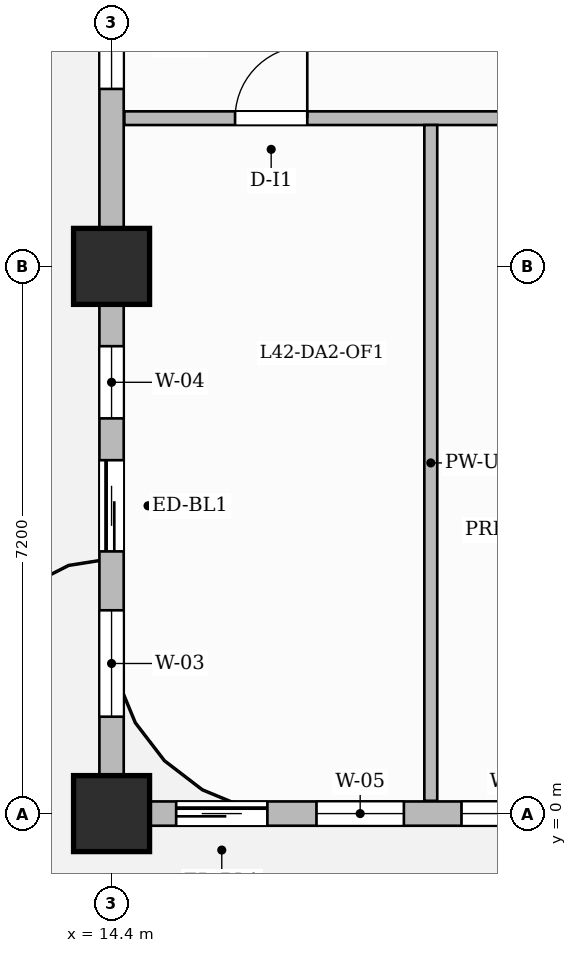
"""IFC4 building model, lengths in metres.
Left out: names, types, materials, properties, quantities, classifications, styles, units other than length and angle.
Written with IfcOpenShell. Run it as: python <this file> out.ifc"""

import sys

from ifc_helpers import new_model, si_unit, direction, frame, frame_2d, origin, origin_2d, place, context, subcontext, project, spatial, rectangle, extrude, source, transform, mapped, element, fill, save


model = new_model("IFC4")
c1 = context("Model", 3, precision=1e-05, world=origin(), true_north=direction((0.0, 1.0)))
c2 = subcontext(c1, "Body", "Model", "MODEL_VIEW")
j1 = project(units=[si_unit("LENGTHUNIT", "METRE"), si_unit("PLANEANGLEUNIT", "RADIAN")], contexts=[c1])
p1 = place(None, origin())
s1 = spatial("IfcSite", under=j1, at=p1, CompositionType="ELEMENT")
p2 = place(p1, origin())
s2 = spatial("IfcBuilding", under=s1, at=p2, CompositionType="ELEMENT")
p3 = place(p2, frame((0.0, 0.0, 169.55)))
s3 = spatial("IfcBuildingStorey", under=s2, at=p3, CompositionType="ELEMENT", Elevation=169.55)
m1 = source(origin(), c2, "Body", "SweptSolid", [
    extrude(rectangle(XDim=1.0, YDim=1.0, at=origin_2d()), origin(), (0.0, 0.0, 1.0), 3.85),
])
for number, where, z_axis, x_axis in (
    (1, (14.4, 0.0, 0.0), (0.0, 0.0, 1.0), (1.0, 0.0, 0.0)),
    (2, (14.4, 7.2, 0.0), (0.0, 0.0, 1.0), (1.0, 0.0, 0.0)),
):
    element("IfcColumn", number, at=place(p3, frame(where, z_axis=z_axis, x_axis=x_axis)), inside=s3, PredefinedType="COLUMN", context=c2, shape_type="MappedRepresentation", body=[
        mapped(m1, transform((0.0, 0.0, 0.0), scale=1.0)),
    ])
p4 = place(p3, frame((14.568, 9.15, 0.0), z_axis=(0.0, 0.0, 1.0), x_axis=(1.0, 0.0, 0.0)))
e3 = element("IfcWall", 3, at=p4, inside=s3, PredefinedType="PARTITIONING", context=c2, shape_type="SweptSolid", body=[
    extrude(rectangle(XDim=15.542, YDim=0.18, at=frame_2d((7.771, 0.0))), origin(), (0.0, 0.0, 1.0), 3.6),
])
p5 = place(p4, frame((1.457, 0.0, 0.0)))
e4 = element("IfcOpeningElement", 4, at=p5, cuts=e3, PredefinedType="OPENING", context=c2, shape_type="SweptSolid", body=[
    extrude(rectangle(XDim=0.95, YDim=2.15, at=frame_2d((0.475, 1.075))), frame((0.0, 0.1, 0.0), z_axis=(0.0, -1.0, 0.0), x_axis=(1.0, 0.0, 0.0)), (0.0, 0.0, 1.0), 0.2),
])
p6 = place(p4, frame((6.117, 0.0, 0.0)))
e5 = element("IfcOpeningElement", 5, at=p6, cuts=e3, PredefinedType="OPENING", context=c2, shape_type="SweptSolid", body=[
    extrude(rectangle(XDim=0.95, YDim=2.15, at=frame_2d((0.475, 1.075))), frame((0.0, 0.1, 0.0), z_axis=(0.0, -1.0, 0.0), x_axis=(1.0, 0.0, 0.0)), (0.0, 0.0, 1.0), 0.2),
])
p7 = place(p4, frame((10.157, 0.0, 0.0)))
e6 = element("IfcOpeningElement", 6, at=p7, cuts=e3, PredefinedType="OPENING", context=c2, shape_type="SweptSolid", body=[
    extrude(rectangle(XDim=0.95, YDim=2.15, at=frame_2d((0.475, 1.075))), frame((0.0, 0.1, 0.0), z_axis=(0.0, -1.0, 0.0), x_axis=(1.0, 0.0, 0.0)), (0.0, 0.0, 1.0), 0.2),
])
p8 = place(p4, frame((13.397, 0.0, 0.0)))
e7 = element("IfcOpeningElement", 7, at=p8, cuts=e3, PredefinedType="OPENING", context=c2, shape_type="SweptSolid", body=[
    extrude(rectangle(XDim=0.95, YDim=2.15, at=frame_2d((0.475, 1.075))), frame((0.0, 0.1, 0.0), z_axis=(0.0, -1.0, 0.0), x_axis=(1.0, 0.0, 0.0)), (0.0, 0.0, 1.0), 0.2),
])
p9 = place(p3, frame((18.6, 0.168, 0.0), z_axis=(0.0, 0.0, 1.0), x_axis=(0.0, 1.0, 0.0)))
e8 = element("IfcWall", 8, at=p9, inside=s3, PredefinedType="PARTITIONING", context=c2, shape_type="SweptSolid", body=[
    extrude(rectangle(XDim=8.892, YDim=0.17, at=frame_2d((4.446, 0.0))), origin(), (0.0, 0.0, 1.0), 3.6),
])
p10 = place(p3, frame((14.4, 0.0, 0.0), z_axis=(0.0, 0.0, 1.0), x_axis=(1.0, 0.0, 0.0)))
e9 = element("IfcWall", 9, at=p10, inside=s3, PredefinedType="SOLIDWALL", context=c2, shape_type="SweptSolid", body=[
    extrude(rectangle(XDim=35.4, YDim=0.32, at=frame_2d((17.7, 0.0))), origin(), (0.0, 0.0, 1.0), 3.085),
])
p11 = place(p10, frame((0.85, 0.0, 0.0)))
e10 = element("IfcOpeningElement", 10, at=p11, cuts=e9, PredefinedType="OPENING", context=c2, shape_type="SweptSolid", body=[
    extrude(rectangle(XDim=1.2, YDim=2.2, at=frame_2d((0.6, 1.1))), frame((0.0, 0.17, 0.0), z_axis=(0.0, -1.0, 0.0), x_axis=(1.0, 0.0, 0.0)), (0.0, 0.0, 1.0), 0.34),
])
p12 = place(p10, frame((2.696, 0.0, 0.8)))
e11 = element("IfcOpeningElement", 11, at=p12, cuts=e9, PredefinedType="OPENING", context=c2, shape_type="SweptSolid", body=[
    extrude(rectangle(XDim=1.15, YDim=1.8, at=frame_2d((0.575, 0.9))), frame((0.0, 0.17, 0.0), z_axis=(0.0, -1.0, 0.0), x_axis=(1.0, 0.0, 0.0)), (0.0, 0.0, 1.0), 0.34),
])
p13 = place(p10, frame((4.604, 0.0, 0.8)))
e12 = element("IfcOpeningElement", 12, at=p13, cuts=e9, PredefinedType="OPENING", context=c2, shape_type="SweptSolid", body=[
    extrude(rectangle(XDim=1.4, YDim=1.85, at=frame_2d((0.7, 0.925))), frame((0.0, 0.17, 0.0), z_axis=(0.0, -1.0, 0.0), x_axis=(1.0, 0.0, 0.0)), (0.0, 0.0, 1.0), 0.34),
])
p14 = place(p10, frame((8.181, 0.0, 0.8)))
e13 = element("IfcOpeningElement", 13, at=p14, cuts=e9, PredefinedType="OPENING", context=c2, shape_type="SweptSolid", body=[
    extrude(rectangle(XDim=0.95, YDim=1.75, at=frame_2d((0.475, 0.875))), frame((0.0, 0.17, 0.0), z_axis=(0.0, -1.0, 0.0), x_axis=(1.0, 0.0, 0.0)), (0.0, 0.0, 1.0), 0.34),
])
p15 = place(p10, frame((9.9, 0.0, 0.8)))
e14 = element("IfcOpeningElement", 14, at=p15, cuts=e9, PredefinedType="OPENING", context=c2, shape_type="SweptSolid", body=[
    extrude(rectangle(XDim=1.8, YDim=1.85, at=frame_2d((0.9, 0.925))), frame((0.0, 0.17, 0.0), z_axis=(0.0, -1.0, 0.0), x_axis=(1.0, 0.0, 0.0)), (0.0, 0.0, 1.0), 0.34),
])
p16 = place(p10, frame((12.469, 0.0, 0.8)))
e15 = element("IfcOpeningElement", 15, at=p16, cuts=e9, PredefinedType="OPENING", context=c2, shape_type="SweptSolid", body=[
    extrude(rectangle(XDim=0.95, YDim=1.75, at=frame_2d((0.475, 0.875))), frame((0.0, 0.17, 0.0), z_axis=(0.0, -1.0, 0.0), x_axis=(1.0, 0.0, 0.0)), (0.0, 0.0, 1.0), 0.34),
])
p17 = place(p10, frame((16.804, 0.0, 0.8)))
e16 = element("IfcOpeningElement", 16, at=p17, cuts=e9, PredefinedType="OPENING", context=c2, shape_type="SweptSolid", body=[
    extrude(rectangle(XDim=1.8, YDim=1.85, at=frame_2d((0.9, 0.925))), frame((0.0, 0.17, 0.0), z_axis=(0.0, -1.0, 0.0), x_axis=(1.0, 0.0, 0.0)), (0.0, 0.0, 1.0), 0.34),
])
p18 = place(p10, frame((21.521, 0.0, 0.8)))
e17 = element("IfcOpeningElement", 17, at=p18, cuts=e9, PredefinedType="OPENING", context=c2, shape_type="SweptSolid", body=[
    extrude(rectangle(XDim=0.95, YDim=1.75, at=frame_2d((0.475, 0.875))), frame((0.0, 0.17, 0.0), z_axis=(0.0, -1.0, 0.0), x_axis=(1.0, 0.0, 0.0)), (0.0, 0.0, 1.0), 0.34),
])
p19 = place(p10, frame((23.904, 0.0, 0.8)))
e18 = element("IfcOpeningElement", 18, at=p19, cuts=e9, PredefinedType="OPENING", context=c2, shape_type="SweptSolid", body=[
    extrude(rectangle(XDim=1.8, YDim=1.85, at=frame_2d((0.9, 0.925))), frame((0.0, 0.17, 0.0), z_axis=(0.0, -1.0, 0.0), x_axis=(1.0, 0.0, 0.0)), (0.0, 0.0, 1.0), 0.34),
])
p20 = place(p10, frame((29.681, 0.0, 0.8)))
e19 = element("IfcOpeningElement", 19, at=p20, cuts=e9, PredefinedType="OPENING", context=c2, shape_type="SweptSolid", body=[
    extrude(rectangle(XDim=1.8, YDim=1.85, at=frame_2d((0.9, 0.925))), frame((0.0, 0.17, 0.0), z_axis=(0.0, -1.0, 0.0), x_axis=(1.0, 0.0, 0.0)), (0.0, 0.0, 1.0), 0.34),
])
p21 = place(p10, frame((32.327, 0.0, 0.8)))
e20 = element("IfcOpeningElement", 20, at=p21, cuts=e9, PredefinedType="OPENING", context=c2, shape_type="SweptSolid", body=[
    extrude(rectangle(XDim=1.8, YDim=1.85, at=frame_2d((0.9, 0.925))), frame((0.0, 0.17, 0.0), z_axis=(0.0, -1.0, 0.0), x_axis=(1.0, 0.0, 0.0)), (0.0, 0.0, 1.0), 0.34),
])
p22 = place(p3, frame((14.4, 0.05, 0.0), z_axis=(0.0, 0.0, 1.0), x_axis=(0.0, 1.0, 0.0)))
e21 = element("IfcWall", 21, at=p22, inside=s3, PredefinedType="SOLIDWALL", context=c2, shape_type="SweptSolid", body=[
    extrude(rectangle(XDim=20.6, YDim=0.32, at=frame_2d((10.3, 0.0))), origin(), (0.0, 0.0, 1.0), 3.085),
])
p23 = place(p22, frame((3.4, 0.0, 0.0)))
e22 = element("IfcOpeningElement", 22, at=p23, cuts=e21, PredefinedType="OPENING", context=c2, shape_type="SweptSolid", body=[
    extrude(rectangle(XDim=1.2, YDim=2.2, at=frame_2d((0.6, 1.1))), frame((0.0, 0.17, 0.0), z_axis=(0.0, -1.0, 0.0), x_axis=(1.0, 0.0, 0.0)), (0.0, 0.0, 1.0), 0.34),
])
p24 = place(p22, frame((1.225, 0.0, 0.8)))
e23 = element("IfcOpeningElement", 23, at=p24, cuts=e21, PredefinedType="OPENING", context=c2, shape_type="SweptSolid", body=[
    extrude(rectangle(XDim=1.4, YDim=1.85, at=frame_2d((0.7, 0.925))), frame((0.0, 0.17, 0.0), z_axis=(0.0, -1.0, 0.0), x_axis=(1.0, 0.0, 0.0)), (0.0, 0.0, 1.0), 0.34),
])
p25 = place(p22, frame((5.15, 0.0, 0.8)))
e24 = element("IfcOpeningElement", 24, at=p25, cuts=e21, PredefinedType="OPENING", context=c2, shape_type="SweptSolid", body=[
    extrude(rectangle(XDim=0.95, YDim=1.75, at=frame_2d((0.475, 0.875))), frame((0.0, 0.17, 0.0), z_axis=(0.0, -1.0, 0.0), x_axis=(1.0, 0.0, 0.0)), (0.0, 0.0, 1.0), 0.34),
])
p26 = place(p22, frame((9.485, 0.0, 0.8)))
e25 = element("IfcOpeningElement", 25, at=p26, cuts=e21, PredefinedType="OPENING", context=c2, shape_type="SweptSolid", body=[
    extrude(rectangle(XDim=1.15, YDim=1.8, at=frame_2d((0.575, 0.9))), frame((0.0, 0.17, 0.0), z_axis=(0.0, -1.0, 0.0), x_axis=(1.0, 0.0, 0.0)), (0.0, 0.0, 1.0), 0.34),
])
p27 = place(p22, frame((11.389, 0.0, 0.8)))
e26 = element("IfcOpeningElement", 26, at=p27, cuts=e21, PredefinedType="OPENING", context=c2, shape_type="SweptSolid", body=[
    extrude(rectangle(XDim=1.8, YDim=1.85, at=frame_2d((0.9, 0.925))), frame((0.0, 0.17, 0.0), z_axis=(0.0, -1.0, 0.0), x_axis=(1.0, 0.0, 0.0)), (0.0, 0.0, 1.0), 0.34),
])
p28 = place(p22, frame((16.79, 0.0, 0.8)))
e27 = element("IfcOpeningElement", 27, at=p28, cuts=e21, PredefinedType="OPENING", context=c2, shape_type="SweptSolid", body=[
    extrude(rectangle(XDim=1.8, YDim=1.85, at=frame_2d((0.9, 0.925))), frame((0.0, 0.17, 0.0), z_axis=(0.0, -1.0, 0.0), x_axis=(1.0, 0.0, 0.0)), (0.0, 0.0, 1.0), 0.34),
])
m2 = source(origin(), c2, "Body", "SweptSolid", [
    extrude(rectangle(XDim=0.95, YDim=2.15, at=frame_2d((0.475, 1.075))), frame((0.0, 0.025, 0.0), z_axis=(0.0, -1.0, 0.0), x_axis=(1.0, 0.0, 0.0)), (0.0, 0.0, 1.0), 0.05),
])
p29 = place(p5, origin())
e28 = element("IfcDoor", 28, at=p29, inside=s3, OperationType="SINGLE_SWING_RIGHT", PredefinedType="DOOR", context=c2, shape_type="MappedRepresentation", body=[
    mapped(m2, transform((0.0, 0.0, 0.0), scale=1.0)),
])
fill(e4, e28)
m3 = source(origin(), c2, "Body", "SweptSolid", [
    extrude(rectangle(XDim=1.2, YDim=2.2, at=frame_2d((0.6, 1.1))), frame((0.0, 0.025, 0.0), z_axis=(0.0, -1.0, 0.0), x_axis=(1.0, 0.0, 0.0)), (0.0, 0.0, 1.0), 0.05),
])
p30 = place(p11, origin())
e29 = element("IfcDoor", 29, at=p30, inside=s3, OperationType="SLIDING_TO_LEFT", PredefinedType="DOOR", context=c2, shape_type="MappedRepresentation", body=[
    mapped(m3, transform((0.0, 0.0, 0.0), scale=1.0)),
])
fill(e10, e29)
p31 = place(p23, origin())
e30 = element("IfcDoor", 30, at=p31, inside=s3, OperationType="SLIDING_TO_LEFT", PredefinedType="DOOR", context=c2, shape_type="MappedRepresentation", body=[
    mapped(m3, transform((0.0, 0.0, 0.0), scale=1.0)),
])
fill(e22, e30)
m4 = source(origin(), c2, "Body", "SweptSolid", [
    extrude(rectangle(XDim=1.15, YDim=1.8, at=frame_2d((0.575, 0.9))), frame((0.0, 0.03, 0.0), z_axis=(0.0, -1.0, 0.0), x_axis=(1.0, 0.0, 0.0)), (0.0, 0.0, 1.0), 0.06),
])
p32 = place(p12, origin())
e31 = element("IfcWindow", 31, at=p32, inside=s3, PartitioningType="SINGLE_PANEL", PredefinedType="WINDOW", context=c2, shape_type="MappedRepresentation", body=[
    mapped(m4, transform((0.0, 0.0, 0.0), scale=1.0)),
])
fill(e11, e31)
m5 = source(origin(), c2, "Body", "SweptSolid", [
    extrude(rectangle(XDim=1.4, YDim=1.85, at=frame_2d((0.7, 0.925))), frame((0.0, 0.03, 0.0), z_axis=(0.0, -1.0, 0.0), x_axis=(1.0, 0.0, 0.0)), (0.0, 0.0, 1.0), 0.06),
])
p33 = place(p13, origin())
e32 = element("IfcWindow", 32, at=p33, inside=s3, PartitioningType="SINGLE_PANEL", PredefinedType="WINDOW", context=c2, shape_type="MappedRepresentation", body=[
    mapped(m5, transform((0.0, 0.0, 0.0), scale=1.0)),
])
fill(e12, e32)
p34 = place(p24, origin())
e33 = element("IfcWindow", 33, at=p34, inside=s3, PartitioningType="SINGLE_PANEL", PredefinedType="WINDOW", context=c2, shape_type="MappedRepresentation", body=[
    mapped(m5, transform((0.0, 0.0, 0.0), scale=1.0)),
])
fill(e23, e33)
m6 = source(origin(), c2, "Body", "SweptSolid", [
    extrude(rectangle(XDim=0.95, YDim=1.75, at=frame_2d((0.475, 0.875))), frame((0.0, 0.03, 0.0), z_axis=(0.0, -1.0, 0.0), x_axis=(1.0, 0.0, 0.0)), (0.0, 0.0, 1.0), 0.06),
])
p35 = place(p25, origin())
e34 = element("IfcWindow", 34, at=p35, inside=s3, PartitioningType="SINGLE_PANEL", PredefinedType="WINDOW", context=c2, shape_type="MappedRepresentation", body=[
    mapped(m6, transform((0.0, 0.0, 0.0), scale=1.0)),
])
fill(e24, e34)
p36 = place(p26, origin())
e35 = element("IfcWindow", 35, at=p36, inside=s3, PartitioningType="SINGLE_PANEL", PredefinedType="WINDOW", context=c2, shape_type="MappedRepresentation", body=[
    mapped(m4, transform((0.0, 0.0, 0.0), scale=1.0)),
])
fill(e25, e35)
save(model, sys.argv[1])
